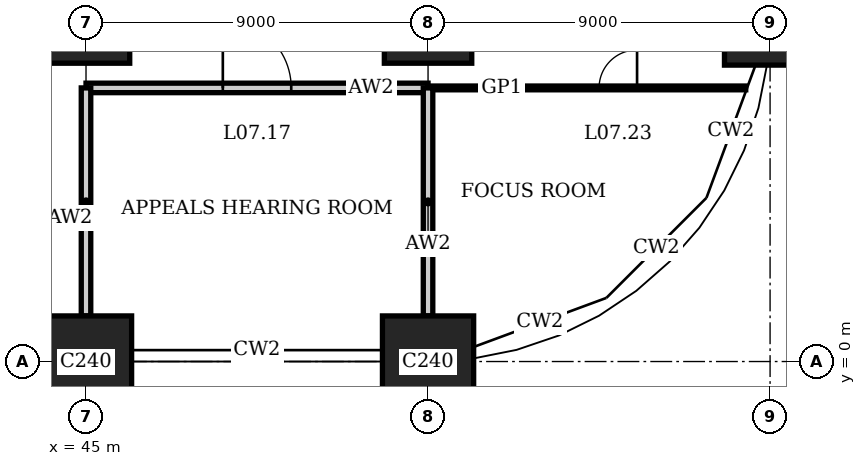
"""IFC4 building model, lengths in metres.
Left out: names, types, materials, properties, quantities, classifications, styles, units other than length and angle.
Written with IfcOpenShell. Run it as: python <this file> out.ifc"""

import sys

from ifc_helpers import new_model, si_unit, direction, frame, frame_2d, origin, origin_2d, place, context, subcontext, project, spatial, rectangle, extrude, element, fill, save


model = new_model("IFC4")
c1 = context("Model", 3, precision=1e-05, world=origin(), true_north=direction((0.0, 1.0)))
c2 = subcontext(c1, "Body", "Model", "MODEL_VIEW")
j1 = project(units=[si_unit("LENGTHUNIT", "METRE"), si_unit("PLANEANGLEUNIT", "RADIAN")], contexts=[c1])
p1 = place(None, origin())
s1 = spatial("IfcSite", under=j1, at=p1, CompositionType="ELEMENT")
p2 = place(p1, origin())
s2 = spatial("IfcBuilding", under=s1, at=p2, CompositionType="ELEMENT")
p3 = place(p2, frame((0.0, 0.0, 31.8)))
s3 = spatial("IfcBuildingStorey", under=s2, at=p3, CompositionType="ELEMENT", Elevation=31.8)
p4 = place(p3, frame((45.0, 0.0, 0.0), z_axis=(0.0, 0.0, 1.0), x_axis=(1.0, 0.0, 0.0)))
e1 = element("IfcColumn", 1, at=p4, inside=s3, PredefinedType="COLUMN", context=c2, shape_type="SweptSolid", body=[
    extrude(rectangle(XDim=2.4, YDim=2.4, at=origin_2d()), origin(), (0.0, 0.0, 1.0), 4.0),
])
p5 = place(p3, frame((45.0, 9.0, 0.0), z_axis=(0.0, 0.0, 1.0), x_axis=(1.0, 0.0, 0.0)))
e2 = element("IfcColumn", 2, at=p5, inside=s3, PredefinedType="COLUMN", context=c2, shape_type="SweptSolid", body=[
    extrude(rectangle(XDim=2.3, YDim=2.3, at=origin_2d()), origin(), (0.0, 0.0, 1.0), 4.0),
])
p6 = place(p3, frame((54.0, 0.0, 0.0), z_axis=(0.0, 0.0, 1.0), x_axis=(1.0, 0.0, 0.0)))
e3 = element("IfcColumn", 3, at=p6, inside=s3, PredefinedType="COLUMN", context=c2, shape_type="SweptSolid", body=[
    extrude(rectangle(XDim=2.4, YDim=2.4, at=origin_2d()), origin(), (0.0, 0.0, 1.0), 4.0),
])
p7 = place(p3, frame((54.0, 9.0, 0.0), z_axis=(0.0, 0.0, 1.0), x_axis=(1.0, 0.0, 0.0)))
e4 = element("IfcColumn", 4, at=p7, inside=s3, PredefinedType="COLUMN", context=c2, shape_type="SweptSolid", body=[
    extrude(rectangle(XDim=2.3, YDim=2.3, at=origin_2d()), origin(), (0.0, 0.0, 1.0), 4.0),
])
p8 = place(p3, frame((63.0, 9.0, 0.0), z_axis=(0.0, 0.0, 1.0), x_axis=(1.0, 0.0, 0.0)))
e5 = element("IfcColumn", 5, at=p8, inside=s3, PredefinedType="COLUMN", context=c2, shape_type="SweptSolid", body=[
    extrude(rectangle(XDim=2.4, YDim=2.4, at=origin_2d()), origin(), (0.0, 0.0, 1.0), 4.0),
])
p9 = place(p3, frame((45.0, 7.2, 0.0), z_axis=(0.0, 0.0, 1.0), x_axis=(1.0, 0.0, 0.0)))
e6 = element("IfcWall", 6, at=p9, inside=s3, PredefinedType="PARTITIONING", context=c2, shape_type="SweptSolid", body=[
    extrude(rectangle(XDim=9.0, YDim=0.25, at=frame_2d((4.5, 0.0))), origin(), (0.0, 0.0, 1.0), 3.75),
])
p10 = place(p9, frame((3.6, 0.0, 0.0)))
e7 = element("IfcOpeningElement", 7, at=p10, cuts=e6, PredefinedType="OPENING", context=c2, shape_type="SweptSolid", body=[
    extrude(rectangle(XDim=1.8, YDim=2.4, at=frame_2d((0.9, 1.2))), frame((0.0, 0.135, 0.0), z_axis=(0.0, -1.0, 0.0), x_axis=(1.0, 0.0, 0.0)), (0.0, 0.0, 1.0), 0.27),
])
p11 = place(p3, frame((54.0, 7.2, 0.0), z_axis=(0.0, 0.0, 1.0), x_axis=(1.0, 0.0, 0.0)))
e8 = element("IfcWall", 8, at=p11, inside=s3, PredefinedType="PARTITIONING", context=c2, shape_type="SweptSolid", body=[
    extrude(rectangle(XDim=8.359, YDim=0.1, at=frame_2d((4.18, 0.0))), origin(), (0.0, 0.0, 1.0), 3.75),
])
p12 = place(p11, frame((4.5, 0.0, 0.0)))
e9 = element("IfcOpeningElement", 9, at=p12, cuts=e8, PredefinedType="OPENING", context=c2, shape_type="SweptSolid", body=[
    extrude(rectangle(XDim=1.0, YDim=2.4, at=frame_2d((0.5, 1.2))), frame((0.0, 0.06, 0.0), z_axis=(0.0, -1.0, 0.0), x_axis=(1.0, 0.0, 0.0)), (0.0, 0.0, 1.0), 0.12),
])
for number, where, z_axis, x_axis in (
    (10, (45.0, 1.2, 0.0), (0.0, 0.0, 1.0), (0.0, 1.0, 0.0)),
    (11, (54.0, 1.2, 0.0), (0.0, 0.0, 1.0), (0.0, 1.0, 0.0)),
):
    element("IfcWall", number, at=place(p3, frame(where, z_axis=z_axis, x_axis=x_axis)), inside=s3, PredefinedType="PARTITIONING", context=c2, shape_type="SweptSolid", body=[
        extrude(rectangle(XDim=6.0, YDim=0.25, at=frame_2d((3.0, 0.0))), origin(), (0.0, 0.0, 1.0), 3.05),
    ])
p13 = place(p10, origin())
e12 = element("IfcDoor", 12, at=p13, inside=s3, OperationType="DOUBLE_DOOR_SINGLE_SWING", PredefinedType="DOOR", context=c2, shape_type="SweptSolid", body=[
    extrude(rectangle(XDim=1.8, YDim=2.4, at=frame_2d((0.9, 1.2))), frame((0.0, 0.025, 0.0), z_axis=(0.0, -1.0, 0.0), x_axis=(1.0, 0.0, 0.0)), (0.0, 0.0, 1.0), 0.05),
])
fill(e7, e12)
p14 = place(p12, origin())
e13 = element("IfcDoor", 13, at=p14, inside=s3, OperationType="SINGLE_SWING_LEFT", PredefinedType="DOOR", context=c2, shape_type="SweptSolid", body=[
    extrude(rectangle(XDim=1.0, YDim=2.4, at=frame_2d((0.5, 1.2))), frame((0.0, 0.02, 0.0), z_axis=(0.0, -1.0, 0.0), x_axis=(1.0, 0.0, 0.0)), (0.0, 0.0, 1.0), 0.04),
])
fill(e9, e13)
save(model, sys.argv[1])
